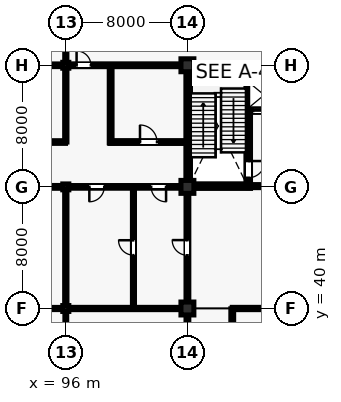
"""IFC4 building model, lengths in metres.
Left out: names, types, materials, properties, quantities, classifications, styles, units other than length and angle.
Written with IfcOpenShell. Run it as: python <this file> out.ifc"""

import sys

from ifc_helpers import new_model, si_unit, direction, frame, frame_2d, origin, origin_2d, place, context, subcontext, project, spatial, rectangle, i_section, extrude, element, fill, save


model = new_model("IFC4")
c1 = context("Model", 3, precision=1e-05, world=origin(), true_north=direction((0.0, 1.0)))
c2 = subcontext(c1, "Body", "Model", "MODEL_VIEW")
j1 = project(units=[si_unit("LENGTHUNIT", "METRE"), si_unit("PLANEANGLEUNIT", "RADIAN")], contexts=[c1])
p1 = place(None, origin())
s1 = spatial("IfcSite", under=j1, at=p1, CompositionType="ELEMENT")
p2 = place(p1, origin())
s2 = spatial("IfcBuilding", under=s1, at=p2, CompositionType="ELEMENT")
p3 = place(p2, origin())
s3 = spatial("IfcBuildingStorey", under=s2, at=p3, CompositionType="ELEMENT", Elevation=0.0)
for number, where, z_axis, x_axis in (
    (1, (96.0, 40.0, 0.0), (0.0, 0.0, 1.0), (1.0, 0.0, 0.0)),
    (2, (96.0, 48.0, 0.0), (0.0, 0.0, 1.0), (1.0, 0.0, 0.0)),
    (3, (96.0, 56.0, 0.0), (0.0, 0.0, 1.0), (1.0, 0.0, 0.0)),
):
    element("IfcColumn", number, at=place(p3, frame(where, z_axis=z_axis, x_axis=x_axis)), inside=s3, PredefinedType="COLUMN", context=c2, shape_type="SweptSolid", body=[
        extrude(i_section(OverallWidth=0.398, OverallDepth=0.387, WebThickness=0.021, FlangeThickness=0.033, FilletRadius=0.015, at=origin_2d()), origin(), (0.0, 0.0, 1.0), 5.28),
    ])
for number, where, z_axis, x_axis in (
    (4, (104.0, 40.0, 0.0), (0.0, 0.0, 1.0), (1.0, 0.0, 0.0)),
    (5, (104.0, 48.0, 0.0), (0.0, 0.0, 1.0), (1.0, 0.0, 0.0)),
    (6, (104.0, 56.0, 0.0), (0.0, 0.0, 1.0), (1.0, 0.0, 0.0)),
):
    element("IfcColumn", number, at=place(p3, frame(where, z_axis=z_axis, x_axis=x_axis)), inside=s3, PredefinedType="COLUMN", context=c2, shape_type="SweptSolid", body=[
        extrude(rectangle(XDim=0.85, YDim=0.85, at=origin_2d()), origin(), (0.0, 0.0, 1.0), 5.28),
    ])
p4 = place(p3, frame((104.05, 48.315, 0.0), z_axis=(0.0, 0.0, 1.0), x_axis=(0.0, 1.0, 0.0)))
e7 = element("IfcWall", 7, at=p4, inside=s3, PredefinedType="SHEAR", context=c2, shape_type="SweptSolid", body=[
    extrude(rectangle(XDim=7.37, YDim=0.3, at=frame_2d((3.685, 0.0))), origin(), (0.0, 0.0, 1.0), 5.035),
])
p5 = place(p3, frame((104.315, 55.95, 0.0), z_axis=(0.0, 0.0, 1.0), x_axis=(1.0, 0.0, 0.0)))
e8 = element("IfcWall", 8, at=p5, inside=s3, PredefinedType="SHEAR", context=c2, shape_type="SweptSolid", body=[
    extrude(rectangle(XDim=7.395, YDim=0.3, at=frame_2d((3.698, 0.0))), origin(), (0.0, 0.0, 1.0), 5.035),
])
p6 = place(p3, frame((104.315, 48.05, 0.0), z_axis=(0.0, 0.0, 1.0), x_axis=(1.0, 0.0, 0.0)))
e9 = element("IfcWall", 9, at=p6, inside=s3, PredefinedType="SHEAR", context=c2, shape_type="SweptSolid", body=[
    extrude(rectangle(XDim=3.835, YDim=0.3, at=frame_2d((1.917, 0.0))), origin(), (0.0, 0.0, 1.0), 5.035),
])
p7 = place(p3, frame((108.0, 48.05, 0.0), z_axis=(0.0, 0.0, 1.0), x_axis=(0.0, 1.0, 0.0)))
e10 = element("IfcWall", 10, at=p7, inside=s3, PredefinedType="SHEAR", context=c2, shape_type="SweptSolid", body=[
    extrude(rectangle(XDim=7.9, YDim=0.3, at=frame_2d((3.95, 0.0))), origin(), (0.0, 0.0, 1.0), 5.035),
])
p8 = place(p7, frame((0.55, 0.0, 0.0)))
e11 = element("IfcOpeningElement", 11, at=p8, cuts=e10, PredefinedType="OPENING", context=c2, shape_type="SweptSolid", body=[
    extrude(rectangle(XDim=1.1, YDim=2.15, at=frame_2d((0.55, 1.075))), frame((0.0, 0.16, 0.0), z_axis=(0.0, -1.0, 0.0), x_axis=(1.0, 0.0, 0.0)), (0.0, 0.0, 1.0), 0.32),
])
p9 = place(p3, frame((108.0, 53.05, 0.0), z_axis=(0.0, 0.0, 1.0), x_axis=(1.0, 0.0, 0.0)))
e12 = element("IfcWall", 12, at=p9, inside=s3, PredefinedType="SHEAR", context=c2, shape_type="SweptSolid", body=[
    extrude(rectangle(XDim=3.95, YDim=0.3, at=frame_2d((1.975, 0.0))), origin(), (0.0, 0.0, 1.0), 5.035),
])
p10 = place(p9, frame((0.32, 0.0, 0.0)))
e13 = element("IfcOpeningElement", 13, at=p10, cuts=e12, PredefinedType="OPENING", context=c2, shape_type="SweptSolid", body=[
    extrude(rectangle(XDim=1.1, YDim=2.2, at=frame_2d((0.55, 1.1))), frame((0.0, 0.16, 0.0), z_axis=(0.0, -1.0, 0.0), x_axis=(1.0, 0.0, 0.0)), (0.0, 0.0, 1.0), 0.32),
])
p11 = place(p9, frame((2.28, 0.0, 0.0)))
e14 = element("IfcOpeningElement", 14, at=p11, cuts=e12, PredefinedType="OPENING", context=c2, shape_type="SweptSolid", body=[
    extrude(rectangle(XDim=1.35, YDim=2.3, at=frame_2d((0.675, 1.15))), frame((0.0, 0.16, 0.0), z_axis=(0.0, -1.0, 0.0), x_axis=(1.0, 0.0, 0.0)), (0.0, 0.0, 1.0), 0.32),
])
p12 = place(p3, frame((108.0, 48.05, 0.0), z_axis=(0.0, 0.0, 1.0), x_axis=(1.0, 0.0, 0.0)))
e15 = element("IfcWall", 15, at=p12, inside=s3, PredefinedType="PARTITIONING", context=c2, shape_type="SweptSolid", body=[
    extrude(rectangle(XDim=3.61, YDim=0.2, at=frame_2d((1.805, 0.0))), origin(), (0.0, 0.0, 1.0), 4.404),
])
p13 = place(p12, frame((1.205, 0.0, 0.0)))
e16 = element("IfcOpeningElement", 16, at=p13, cuts=e15, PredefinedType="OPENING", context=c2, shape_type="SweptSolid", body=[
    extrude(rectangle(XDim=1.2, YDim=2.15, at=frame_2d((0.6, 1.075))), frame((0.0, 0.11, 0.0), z_axis=(0.0, -1.0, 0.0), x_axis=(1.0, 0.0, 0.0)), (0.0, 0.0, 1.0), 0.22),
])
p14 = place(p3, frame((90.9, 50.95, 0.0), z_axis=(0.0, 0.0, 1.0), x_axis=(1.0, 0.0, 0.0)))
e17 = element("IfcWall", 17, at=p14, inside=s3, PredefinedType="PARTITIONING", context=c2, shape_type="SweptSolid", body=[
    extrude(rectangle(XDim=5.08, YDim=0.175, at=frame_2d((2.54, 0.0))), origin(), (0.0, 0.0, 1.0), 4.404),
])
p15 = place(p14, frame((2.05, 0.0, 0.0)))
e18 = element("IfcOpeningElement", 18, at=p15, cuts=e17, PredefinedType="OPENING", context=c2, shape_type="SweptSolid", body=[
    extrude(rectangle(XDim=0.98, YDim=2.15, at=frame_2d((0.49, 1.075))), frame((0.0, 0.097, 0.0), z_axis=(0.0, -1.0, 0.0), x_axis=(1.0, 0.0, 0.0)), (0.0, 0.0, 1.0), 0.195),
])
p16 = place(p3, frame((96.0, 50.95, 0.0), z_axis=(0.0, 0.0, 1.0), x_axis=(0.0, 1.0, 0.0)))
e19 = element("IfcWall", 19, at=p16, inside=s3, PredefinedType="PARTITIONING", context=c2, shape_type="SweptSolid", body=[
    extrude(rectangle(XDim=4.846, YDim=0.15, at=frame_2d((2.423, 0.0))), origin(), (0.0, 0.0, 1.0), 4.404),
])
p17 = place(p3, frame((98.9, 50.95, 0.0), z_axis=(0.0, 0.0, 1.0), x_axis=(1.0, 0.0, 0.0)))
e20 = element("IfcWall", 20, at=p17, inside=s3, PredefinedType="PARTITIONING", context=c2, shape_type="SweptSolid", body=[
    extrude(rectangle(XDim=5.08, YDim=0.185, at=frame_2d((2.54, 0.0))), origin(), (0.0, 0.0, 1.0), 4.471),
])
p18 = place(p17, frame((1.98, 0.0, 0.0)))
e21 = element("IfcOpeningElement", 21, at=p18, cuts=e20, PredefinedType="OPENING", context=c2, shape_type="SweptSolid", body=[
    extrude(rectangle(XDim=1.12, YDim=2.22, at=frame_2d((0.56, 1.11))), frame((0.0, 0.103, 0.0), z_axis=(0.0, -1.0, 0.0), x_axis=(1.0, 0.0, 0.0)), (0.0, 0.0, 1.0), 0.205),
])
p19 = place(p3, frame((98.95, 50.9, 0.0), z_axis=(0.0, 0.0, 1.0), x_axis=(0.0, 1.0, 0.0)))
e22 = element("IfcWall", 22, at=p19, inside=s3, PredefinedType="PARTITIONING", context=c2, shape_type="SweptSolid", body=[
    extrude(rectangle(XDim=5.08, YDim=0.185, at=frame_2d((2.54, 0.0))), origin(), (0.0, 0.0, 1.0), 4.404),
])
p20 = place(p3, frame((106.95, 34.9, 0.0), z_axis=(0.0, 0.0, 1.0), x_axis=(0.0, 1.0, 0.0)))
e23 = element("IfcWall", 23, at=p20, inside=s3, PredefinedType="PARTITIONING", context=c2, shape_type="SweptSolid", body=[
    extrude(rectangle(XDim=5.08, YDim=0.185, at=frame_2d((2.54, 0.0))), origin(), (0.0, 0.0, 1.0), 4.336),
])
p21 = place(p3, frame((106.95, 40.0, 0.0), z_axis=(0.0, 0.0, 1.0), x_axis=(1.0, 0.0, 0.0)))
e24 = element("IfcWall", 24, at=p21, inside=s3, PredefinedType="PARTITIONING", context=c2, shape_type="SweptSolid", body=[
    extrude(rectangle(XDim=4.69, YDim=0.15, at=frame_2d((2.345, 0.0))), origin(), (0.0, 0.0, 1.0), 4.336),
])
p22 = place(p3, frame((96.0, 32.184, 0.0), z_axis=(0.0, 0.0, 1.0), x_axis=(0.0, 1.0, 0.0)))
e25 = element("IfcWall", 25, at=p22, inside=s3, PredefinedType="PARTITIONING", context=c2, shape_type="SweptSolid", body=[
    extrude(rectangle(XDim=7.633, YDim=0.12, at=frame_2d((3.816, 0.0))), origin(), (0.0, 0.0, 1.0), 4.603),
])
p23 = place(p3, frame((88.0, 40.0, 0.0), z_axis=(0.0, 0.0, 1.0), x_axis=(1.0, 0.0, 0.0)))
e26 = element("IfcWall", 26, at=p23, inside=s3, PredefinedType="PARTITIONING", context=c2, shape_type="SweptSolid", body=[
    extrude(rectangle(XDim=7.811, YDim=0.142, at=frame_2d((3.906, 0.0))), origin(), (0.0, 0.0, 1.0), 4.262),
])
p24 = place(p3, frame((96.0, 40.184, 0.0), z_axis=(0.0, 0.0, 1.0), x_axis=(0.0, 1.0, 0.0)))
e27 = element("IfcWall", 27, at=p24, inside=s3, PredefinedType="PARTITIONING", context=c2, shape_type="SweptSolid", body=[
    extrude(rectangle(XDim=7.633, YDim=0.15, at=frame_2d((3.816, 0.0))), origin(), (0.0, 0.0, 1.0), 4.412),
])
p25 = place(p3, frame((88.0, 48.0, 0.0), z_axis=(0.0, 0.0, 1.0), x_axis=(1.0, 0.0, 0.0)))
e28 = element("IfcWall", 28, at=p25, inside=s3, PredefinedType="PARTITIONING", context=c2, shape_type="SweptSolid", body=[
    extrude(rectangle(XDim=7.811, YDim=0.185, at=frame_2d((3.906, 0.0))), origin(), (0.0, 0.0, 1.0), 4.097),
])
p26 = place(p25, frame((3.256, 0.0, 0.0)))
e29 = element("IfcOpeningElement", 29, at=p26, cuts=e28, PredefinedType="OPENING", context=c2, shape_type="SweptSolid", body=[
    extrude(rectangle(XDim=1.3, YDim=2.2, at=frame_2d((0.65, 1.1))), frame((0.0, 0.103, 0.0), z_axis=(0.0, -1.0, 0.0), x_axis=(1.0, 0.0, 0.0)), (0.0, 0.0, 1.0), 0.205),
])
p27 = place(p3, frame((88.0, 56.0, 0.0), z_axis=(0.0, 0.0, 1.0), x_axis=(1.0, 0.0, 0.0)))
e30 = element("IfcWall", 30, at=p27, inside=s3, PredefinedType="PARTITIONING", context=c2, shape_type="SweptSolid", body=[
    extrude(rectangle(XDim=7.811, YDim=0.175, at=frame_2d((3.906, 0.0))), origin(), (0.0, 0.0, 1.0), 4.169),
])
p28 = place(p27, frame((0.52, 0.0, 0.0)))
e31 = element("IfcOpeningElement", 31, at=p28, cuts=e30, PredefinedType="OPENING", context=c2, shape_type="SweptSolid", body=[
    extrude(rectangle(XDim=0.94, YDim=2.12, at=frame_2d((0.47, 1.06))), frame((0.0, 0.097, 0.0), z_axis=(0.0, -1.0, 0.0), x_axis=(1.0, 0.0, 0.0)), (0.0, 0.0, 1.0), 0.195),
])
p29 = place(p3, frame((96.0, 56.184, 0.0), z_axis=(0.0, 0.0, 1.0), x_axis=(0.0, 1.0, 0.0)))
e32 = element("IfcWall", 32, at=p29, inside=s3, PredefinedType="PARTITIONING", context=c2, shape_type="SweptSolid", body=[
    extrude(rectangle(XDim=7.633, YDim=0.142, at=frame_2d((3.816, 0.0))), origin(), (0.0, 0.0, 1.0), 4.471),
])
p30 = place(p3, frame((104.0, 32.415, 0.0), z_axis=(0.0, 0.0, 1.0), x_axis=(0.0, 1.0, 0.0)))
e33 = element("IfcWall", 33, at=p30, inside=s3, PredefinedType="PARTITIONING", context=c2, shape_type="SweptSolid", body=[
    extrude(rectangle(XDim=7.17, YDim=0.185, at=frame_2d((3.585, 0.0))), origin(), (0.0, 0.0, 1.0), 4.412),
])
p31 = place(p30, frame((2.935, 0.0, 0.0)))
e34 = element("IfcOpeningElement", 34, at=p31, cuts=e33, PredefinedType="OPENING", context=c2, shape_type="SweptSolid", body=[
    extrude(rectangle(XDim=1.3, YDim=2.2, at=frame_2d((0.65, 1.1))), frame((0.0, 0.103, 0.0), z_axis=(0.0, -1.0, 0.0), x_axis=(1.0, 0.0, 0.0)), (0.0, 0.0, 1.0), 0.205),
])
p32 = place(p3, frame((96.189, 40.0, 0.0), z_axis=(0.0, 0.0, 1.0), x_axis=(1.0, 0.0, 0.0)))
e35 = element("IfcWall", 35, at=p32, inside=s3, PredefinedType="PARTITIONING", context=c2, shape_type="SweptSolid", body=[
    extrude(rectangle(XDim=7.396, YDim=0.15, at=frame_2d((3.698, 0.0))), origin(), (0.0, 0.0, 1.0), 4.403),
])
p33 = place(p3, frame((104.0, 40.415, 0.0), z_axis=(0.0, 0.0, 1.0), x_axis=(0.0, 1.0, 0.0)))
e36 = element("IfcWall", 36, at=p33, inside=s3, PredefinedType="PARTITIONING", context=c2, shape_type="SweptSolid", body=[
    extrude(rectangle(XDim=7.17, YDim=0.185, at=frame_2d((3.585, 0.0))), origin(), (0.0, 0.0, 1.0), 4.404),
])
p34 = place(p33, frame((3.085, 0.0, 0.0)))
e37 = element("IfcOpeningElement", 37, at=p34, cuts=e36, PredefinedType="OPENING", context=c2, shape_type="SweptSolid", body=[
    extrude(rectangle(XDim=1.0, YDim=2.15, at=frame_2d((0.5, 1.075))), frame((0.0, 0.103, 0.0), z_axis=(0.0, -1.0, 0.0), x_axis=(1.0, 0.0, 0.0)), (0.0, 0.0, 1.0), 0.205),
])
p35 = place(p3, frame((96.189, 48.0, 0.0), z_axis=(0.0, 0.0, 1.0), x_axis=(1.0, 0.0, 0.0)))
e38 = element("IfcWall", 38, at=p35, inside=s3, PredefinedType="PARTITIONING", context=c2, shape_type="SweptSolid", body=[
    extrude(rectangle(XDim=7.396, YDim=0.175, at=frame_2d((3.698, 0.0))), origin(), (0.0, 0.0, 1.0), 4.336),
])
p36 = place(p35, frame((1.359, 0.0, 0.0)))
e39 = element("IfcOpeningElement", 39, at=p36, cuts=e38, PredefinedType="OPENING", context=c2, shape_type="SweptSolid", body=[
    extrude(rectangle(XDim=0.98, YDim=2.15, at=frame_2d((0.49, 1.075))), frame((0.0, 0.097, 0.0), z_axis=(0.0, -1.0, 0.0), x_axis=(1.0, 0.0, 0.0)), (0.0, 0.0, 1.0), 0.195),
])
p37 = place(p35, frame((5.427, 0.0, 0.0)))
e40 = element("IfcOpeningElement", 40, at=p37, cuts=e38, PredefinedType="OPENING", context=c2, shape_type="SweptSolid", body=[
    extrude(rectangle(XDim=0.98, YDim=2.15, at=frame_2d((0.49, 1.075))), frame((0.0, 0.097, 0.0), z_axis=(0.0, -1.0, 0.0), x_axis=(1.0, 0.0, 0.0)), (0.0, 0.0, 1.0), 0.195),
])
p38 = place(p3, frame((96.189, 56.0, 0.0), z_axis=(0.0, 0.0, 1.0), x_axis=(1.0, 0.0, 0.0)))
e41 = element("IfcWall", 41, at=p38, inside=s3, PredefinedType="PARTITIONING", context=c2, shape_type="SweptSolid", body=[
    extrude(rectangle(XDim=7.396, YDim=0.185, at=frame_2d((3.698, 0.0))), origin(), (0.0, 0.0, 1.0), 4.404),
])
p39 = place(p38, frame((0.52, 0.0, 0.0)))
e42 = element("IfcOpeningElement", 42, at=p39, cuts=e41, PredefinedType="OPENING", context=c2, shape_type="SweptSolid", body=[
    extrude(rectangle(XDim=0.94, YDim=2.12, at=frame_2d((0.47, 1.06))), frame((0.0, 0.103, 0.0), z_axis=(0.0, -1.0, 0.0), x_axis=(1.0, 0.0, 0.0)), (0.0, 0.0, 1.0), 0.205),
])
p40 = place(p3, frame((100.45, 40.02, 0.0), z_axis=(0.0, 0.0, 1.0), x_axis=(0.0, 1.0, 0.0)))
e43 = element("IfcWall", 43, at=p40, inside=s3, PredefinedType="PARTITIONING", context=c2, shape_type="SweptSolid", body=[
    extrude(rectangle(XDim=7.96, YDim=0.135, at=frame_2d((3.98, 0.0))), origin(), (0.0, 0.0, 1.0), 4.336),
])
p41 = place(p40, frame((3.49, 0.0, 0.0)))
e44 = element("IfcOpeningElement", 44, at=p41, cuts=e43, PredefinedType="OPENING", context=c2, shape_type="SweptSolid", body=[
    extrude(rectangle(XDim=0.98, YDim=2.15, at=frame_2d((0.49, 1.075))), frame((0.0, 0.077, 0.0), z_axis=(0.0, -1.0, 0.0), x_axis=(1.0, 0.0, 0.0)), (0.0, 0.0, 1.0), 0.155),
])
p42 = place(p8, frame((1.1, 0.0, 0.0), z_axis=(0.0, 0.0, 1.0), x_axis=(-1.0, 0.0, 0.0)))
e45 = element("IfcDoor", 45, at=p42, inside=s3, OperationType="SINGLE_SWING_RIGHT", PredefinedType="DOOR", context=c2, shape_type="SweptSolid", body=[
    extrude(rectangle(XDim=1.1, YDim=2.15, at=frame_2d((0.55, 1.075))), frame((0.0, 0.025, 0.0), z_axis=(0.0, -1.0, 0.0), x_axis=(1.0, 0.0, 0.0)), (0.0, 0.0, 1.0), 0.05),
])
fill(e11, e45)
p43 = place(p10, origin())
e46 = element("IfcDoor", 46, at=p43, inside=s3, OperationType="SLIDING_TO_LEFT", PredefinedType="DOOR", context=c2, shape_type="SweptSolid", body=[
    extrude(rectangle(XDim=1.1, YDim=2.2, at=frame_2d((0.55, 1.1))), frame((0.0, 0.025, 0.0), z_axis=(0.0, -1.0, 0.0), x_axis=(1.0, 0.0, 0.0)), (0.0, 0.0, 1.0), 0.05),
])
fill(e13, e46)
p44 = place(p18, origin())
e47 = element("IfcDoor", 47, at=p44, inside=s3, OperationType="SINGLE_SWING_LEFT", PredefinedType="DOOR", context=c2, shape_type="SweptSolid", body=[
    extrude(rectangle(XDim=1.12, YDim=2.22, at=frame_2d((0.56, 1.11))), frame((0.0, 0.025, 0.0), z_axis=(0.0, -1.0, 0.0), x_axis=(1.0, 0.0, 0.0)), (0.0, 0.0, 1.0), 0.05),
])
fill(e21, e47)
p45 = place(p34, origin())
e48 = element("IfcDoor", 48, at=p45, inside=s3, OperationType="SINGLE_SWING_RIGHT", PredefinedType="DOOR", context=c2, shape_type="SweptSolid", body=[
    extrude(rectangle(XDim=1.0, YDim=2.15, at=frame_2d((0.5, 1.075))), frame((0.0, 0.025, 0.0), z_axis=(0.0, -1.0, 0.0), x_axis=(1.0, 0.0, 0.0)), (0.0, 0.0, 1.0), 0.05),
])
fill(e37, e48)
p46 = place(p36, frame((0.98, 0.0, 0.0), z_axis=(0.0, 0.0, 1.0), x_axis=(-1.0, 0.0, 0.0)))
e49 = element("IfcDoor", 49, at=p46, inside=s3, OperationType="SINGLE_SWING_LEFT", PredefinedType="DOOR", context=c2, shape_type="SweptSolid", body=[
    extrude(rectangle(XDim=0.98, YDim=2.15, at=frame_2d((0.49, 1.075))), frame((0.0, 0.025, 0.0), z_axis=(0.0, -1.0, 0.0), x_axis=(1.0, 0.0, 0.0)), (0.0, 0.0, 1.0), 0.05),
])
fill(e39, e49)
p47 = place(p37, frame((0.98, 0.0, 0.0), z_axis=(0.0, 0.0, 1.0), x_axis=(-1.0, 0.0, 0.0)))
e50 = element("IfcDoor", 50, at=p47, inside=s3, OperationType="SINGLE_SWING_RIGHT", PredefinedType="DOOR", context=c2, shape_type="SweptSolid", body=[
    extrude(rectangle(XDim=0.98, YDim=2.15, at=frame_2d((0.49, 1.075))), frame((0.0, 0.025, 0.0), z_axis=(0.0, -1.0, 0.0), x_axis=(1.0, 0.0, 0.0)), (0.0, 0.0, 1.0), 0.05),
])
fill(e40, e50)
p48 = place(p39, origin())
e51 = element("IfcDoor", 51, at=p48, inside=s3, OperationType="SINGLE_SWING_LEFT", PredefinedType="DOOR", context=c2, shape_type="SweptSolid", body=[
    extrude(rectangle(XDim=0.94, YDim=2.12, at=frame_2d((0.47, 1.06))), frame((0.0, 0.025, 0.0), z_axis=(0.0, -1.0, 0.0), x_axis=(1.0, 0.0, 0.0)), (0.0, 0.0, 1.0), 0.05),
])
fill(e42, e51)
p49 = place(p41, origin())
e52 = element("IfcDoor", 52, at=p49, inside=s3, OperationType="SINGLE_SWING_RIGHT", PredefinedType="DOOR", context=c2, shape_type="SweptSolid", body=[
    extrude(rectangle(XDim=0.98, YDim=2.15, at=frame_2d((0.49, 1.075))), frame((0.0, 0.025, 0.0), z_axis=(0.0, -1.0, 0.0), x_axis=(1.0, 0.0, 0.0)), (0.0, 0.0, 1.0), 0.05),
])
fill(e44, e52)
save(model, sys.argv[1])
